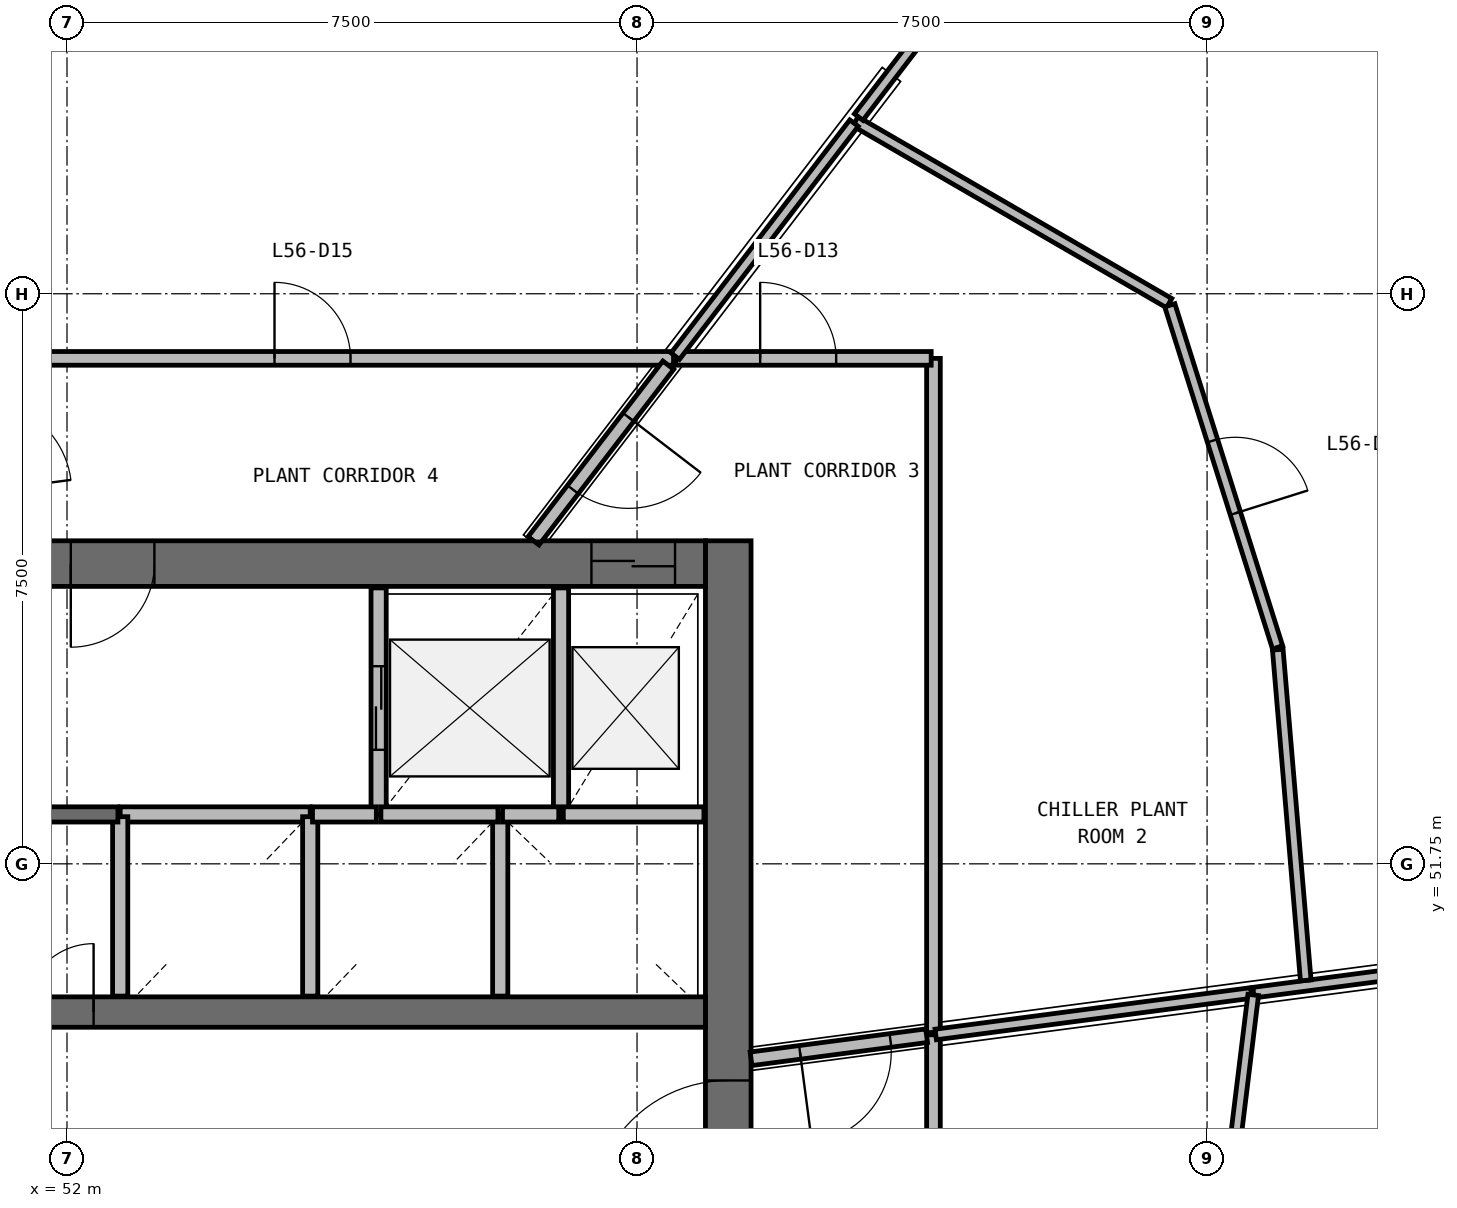
"""IFC4 building model, lengths in metres.
Left out: names, types, materials, properties, quantities, classifications, styles, units other than length and angle.
Written with IfcOpenShell. Run it as: python <this file> out.ifc"""

import sys

from ifc_helpers import new_model, si_unit, direction, frame, frame_2d, origin, place, context, subcontext, project, spatial, rectangle, extrude, source, transform, mapped, element, fill, save


model = new_model("IFC4")
c1 = context("Model", 3, precision=1e-05, world=origin(), true_north=direction((0.0, 1.0)))
c2 = subcontext(c1, "Body", "Model", "MODEL_VIEW")
j1 = project(units=[si_unit("LENGTHUNIT", "METRE"), si_unit("PLANEANGLEUNIT", "RADIAN")], contexts=[c1])
p1 = place(None, origin())
s1 = spatial("IfcSite", under=j1, at=p1, CompositionType="ELEMENT")
p2 = place(p1, origin())
s2 = spatial("IfcBuilding", under=s1, at=p2, CompositionType="ELEMENT")
p3 = place(p2, frame((0.0, 0.0, 230.6)))
s3 = spatial("IfcBuildingStorey", under=s2, at=p3, CompositionType="ELEMENT", Elevation=230.6)
p4 = place(p3, frame((60.7, 40.0, 0.0), z_axis=(0.0, 0.0, 1.0), x_axis=(0.0, 1.0, 0.0)))
e1 = element("IfcWall", 1, at=p4, inside=s3, PredefinedType="SHEAR", context=c2, shape_type="SweptSolid", body=[
    extrude(rectangle(XDim=16.0, YDim=0.6, at=frame_2d((8.0, 0.0))), origin(), (0.0, 0.0, 1.0), 3.9),
])
p5 = place(p4, frame((7.1, 0.0, 0.0)))
e2 = element("IfcOpeningElement", 2, at=p5, cuts=e1, PredefinedType="OPENING", context=c2, shape_type="SweptSolid", body=[
    extrude(rectangle(XDim=1.8, YDim=2.1, at=frame_2d((0.9, 1.05))), frame((0.0, 0.31, 0.0), z_axis=(0.0, -1.0, 0.0), x_axis=(1.0, 0.0, 0.0)), (0.0, 0.0, 1.0), 0.62),
])
p6 = place(p3, frame((60.4, 55.7, 0.0), z_axis=(0.0, 0.0, 1.0), x_axis=(-1.0, 0.0, 0.0)))
e3 = element("IfcWall", 3, at=p6, inside=s3, PredefinedType="SHEAR", context=c2, shape_type="SweptSolid", body=[
    extrude(rectangle(XDim=16.8, YDim=0.6, at=frame_2d((8.4, 0.0))), origin(), (0.0, 0.0, 1.0), 3.9),
])
p7 = place(p6, frame((0.4, 0.0, 0.0)))
e4 = element("IfcOpeningElement", 4, at=p7, cuts=e3, PredefinedType="OPENING", context=c2, shape_type="SweptSolid", body=[
    extrude(rectangle(XDim=1.1, YDim=2.1, at=frame_2d((0.55, 1.05))), frame((0.0, 0.31, 0.0), z_axis=(0.0, -1.0, 0.0), x_axis=(1.0, 0.0, 0.0)), (0.0, 0.0, 1.0), 0.62),
])
p8 = place(p6, frame((10.3, 0.0, 0.0)))
e5 = element("IfcOpeningElement", 5, at=p8, cuts=e3, PredefinedType="OPENING", context=c2, shape_type="SweptSolid", body=[
    extrude(rectangle(XDim=1.2, YDim=2.1, at=frame_2d((0.6, 1.05))), frame((0.0, 0.31, 0.0), z_axis=(0.0, -1.0, 0.0), x_axis=(1.0, 0.0, 0.0)), (0.0, 0.0, 1.0), 0.62),
])
p9 = place(p6, frame((7.25, 0.0, 0.0)))
e6 = element("IfcOpeningElement", 6, at=p9, cuts=e3, PredefinedType="OPENING", context=c2, shape_type="SweptSolid", body=[
    extrude(rectangle(XDim=1.1, YDim=2.1, at=frame_2d((0.55, 1.05))), frame((0.0, 0.31, 0.0), z_axis=(0.0, -1.0, 0.0), x_axis=(1.0, 0.0, 0.0)), (0.0, 0.0, 1.0), 0.62),
])
p10 = place(p3, frame((43.6, 49.8, 0.0), z_axis=(0.0, 0.0, 1.0), x_axis=(1.0, 0.0, 0.0)))
e7 = element("IfcWall", 7, at=p10, inside=s3, PredefinedType="SHEAR", context=c2, shape_type="SweptSolid", body=[
    extrude(rectangle(XDim=16.8, YDim=0.4, at=frame_2d((8.4, 0.0))), origin(), (0.0, 0.0, 1.0), 3.9),
])
p11 = place(p10, frame((4.45, 0.0, 0.0)))
e8 = element("IfcOpeningElement", 8, at=p11, cuts=e7, PredefinedType="OPENING", context=c2, shape_type="SweptSolid", body=[
    extrude(rectangle(XDim=0.9, YDim=2.1, at=frame_2d((0.45, 1.05))), frame((0.0, 0.21, 0.0), z_axis=(0.0, -1.0, 0.0), x_axis=(1.0, 0.0, 0.0)), (0.0, 0.0, 1.0), 0.42),
])
p12 = place(p10, frame((7.85, 0.0, 0.0)))
e9 = element("IfcOpeningElement", 9, at=p12, cuts=e7, PredefinedType="OPENING", context=c2, shape_type="SweptSolid", body=[
    extrude(rectangle(XDim=0.9, YDim=2.1, at=frame_2d((0.45, 1.05))), frame((0.0, 0.21, 0.0), z_axis=(0.0, -1.0, 0.0), x_axis=(1.0, 0.0, 0.0)), (0.0, 0.0, 1.0), 0.42),
])
p13 = place(p3, frame((56.1, 55.38, 0.0), z_axis=(0.0, 0.0, 1.0), x_axis=(0.0, -1.0, 0.0)))
e10 = element("IfcWall", 10, at=p13, inside=s3, PredefinedType="SOLIDWALL", context=c2, shape_type="SweptSolid", body=[
    extrude(rectangle(XDim=2.98, YDim=0.2, at=frame_2d((1.49, 0.0))), origin(), (0.0, 0.0, 1.0), 3.58),
])
p14 = place(p13, frame((1.03, 0.0, 0.0)))
e11 = element("IfcOpeningElement", 11, at=p14, cuts=e10, PredefinedType="OPENING", context=c2, shape_type="SweptSolid", body=[
    extrude(rectangle(XDim=1.1, YDim=2.1, at=frame_2d((0.55, 1.05))), frame((0.0, 0.11, 0.0), z_axis=(0.0, -1.0, 0.0), x_axis=(1.0, 0.0, 0.0)), (0.0, 0.0, 1.0), 0.22),
])
p15 = place(p3, frame((58.5, 52.4, 0.0), z_axis=(0.0, 0.0, 1.0), x_axis=(0.0, 1.0, 0.0)))
e12 = element("IfcWall", 12, at=p15, inside=s3, PredefinedType="SOLIDWALL", context=c2, shape_type="SweptSolid", body=[
    extrude(rectangle(XDim=2.98, YDim=0.2, at=frame_2d((1.49, 0.0))), origin(), (0.0, 0.0, 1.0), 3.58),
])
p16 = place(p3, frame((55.2, 52.4, 0.0), z_axis=(0.0, 0.0, 1.0), x_axis=(-1.0, 0.0, 0.0)))
e13 = element("IfcWall", 13, at=p16, inside=s3, PredefinedType="SOLIDWALL", context=c2, shape_type="SweptSolid", body=[
    extrude(rectangle(XDim=2.5, YDim=0.2, at=frame_2d((1.25, 0.0))), origin(), (0.0, 0.0, 1.0), 3.58),
])
for number, where, z_axis, x_axis in (
    (14, (52.7, 52.37, 0.0), (0.0, 0.0, 1.0), (0.0, -1.0, 0.0)),
    (15, (55.2, 50.01, 0.0), (0.0, 0.0, 1.0), (0.0, 1.0, 0.0)),
):
    element("IfcWall", number, at=place(p3, frame(where, z_axis=z_axis, x_axis=x_axis)), inside=s3, PredefinedType="SOLIDWALL", context=c2, shape_type="SweptSolid", body=[
        extrude(rectangle(XDim=2.36, YDim=0.2, at=frame_2d((1.18, 0.0))), origin(), (0.0, 0.0, 1.0), 3.58),
    ])
p17 = place(p3, frame((57.7, 50.01, 0.0), z_axis=(0.0, 0.0, 1.0), x_axis=(0.0, 1.0, 0.0)))
e16 = element("IfcWall", 16, at=p17, inside=s3, PredefinedType="SOLIDWALL", context=c2, shape_type="SweptSolid", body=[
    extrude(rectangle(XDim=2.39, YDim=0.2, at=frame_2d((1.195, 0.0))), origin(), (0.0, 0.0, 1.0), 3.58),
])
p18 = place(p3, frame((50.43, 52.4, 0.0), z_axis=(0.0, 0.0, 1.0), x_axis=(1.0, 0.0, 0.0)))
e17 = element("IfcWall", 17, at=p18, inside=s3, PredefinedType="SOLIDWALL", context=c2, shape_type="SweptSolid", body=[
    extrude(rectangle(XDim=2.24, YDim=0.2, at=frame_2d((1.12, 0.0))), origin(), (0.0, 0.0, 1.0), 3.58),
])
p19 = place(p3, frame((60.38, 52.4, 0.0), z_axis=(0.0, 0.0, 1.0), x_axis=(-1.0, 0.0, 0.0)))
e18 = element("IfcWall", 18, at=p19, inside=s3, PredefinedType="SOLIDWALL", context=c2, shape_type="SweptSolid", body=[
    extrude(rectangle(XDim=1.85, YDim=0.2, at=frame_2d((0.925, 0.0))), origin(), (0.0, 0.0, 1.0), 3.58),
])
p20 = place(p3, frame((57.67, 52.4, 0.0), z_axis=(0.0, 0.0, 1.0), x_axis=(-1.0, 0.0, 0.0)))
e19 = element("IfcWall", 19, at=p20, inside=s3, PredefinedType="SOLIDWALL", context=c2, shape_type="SweptSolid", body=[
    extrude(rectangle(XDim=1.54, YDim=0.2, at=frame_2d((0.77, 0.0))), origin(), (0.0, 0.0, 1.0), 3.58),
])
p21 = place(p3, frame((56.07, 52.4, 0.0), z_axis=(0.0, 0.0, 1.0), x_axis=(-1.0, 0.0, 0.0)))
e20 = element("IfcWall", 20, at=p21, inside=s3, PredefinedType="SOLIDWALL", context=c2, shape_type="SweptSolid", body=[
    extrude(rectangle(XDim=0.84, YDim=0.2, at=frame_2d((0.42, 0.0))), origin(), (0.0, 0.0, 1.0), 3.58),
])
p22 = place(p3, frame((58.47, 52.4, 0.0), z_axis=(0.0, 0.0, 1.0), x_axis=(-1.0, 0.0, 0.0)))
e21 = element("IfcWall", 21, at=p22, inside=s3, PredefinedType="SOLIDWALL", context=c2, shape_type="SweptSolid", body=[
    extrude(rectangle(XDim=0.74, YDim=0.2, at=frame_2d((0.37, 0.0))), origin(), (0.0, 0.0, 1.0), 3.58),
])
p23 = place(p3, frame((63.4, 49.501, 0.0), z_axis=(0.0, 0.0, 1.0), x_axis=(0.0, -1.0, 0.0)))
e22 = element("IfcWall", 22, at=p23, inside=s3, PredefinedType="PARTITIONING", context=c2, shape_type="SweptSolid", body=[
    extrude(rectangle(XDim=10.248, YDim=0.18, at=frame_2d((5.124, 0.0))), origin(), (0.0, 0.0, 1.0), 2.38),
])
p24 = place(p23, frame((4.598, 0.0, 0.0)))
e23 = element("IfcOpeningElement", 23, at=p24, cuts=e22, PredefinedType="OPENING", context=c2, shape_type="SweptSolid", body=[
    extrude(rectangle(XDim=1.0, YDim=2.1, at=frame_2d((0.5, 1.05))), frame((0.0, 0.1, 0.0), z_axis=(0.0, -1.0, 0.0), x_axis=(1.0, 0.0, 0.0)), (0.0, 0.0, 1.0), 0.2),
])
p25 = place(p3, frame((50.661, 58.4, 0.0), z_axis=(0.0, 0.0, 1.0), x_axis=(1.0, 0.0, 0.0)))
e24 = element("IfcWall", 24, at=p25, inside=s3, PredefinedType="PARTITIONING", context=c2, shape_type="SweptSolid", body=[
    extrude(rectangle(XDim=9.319, YDim=0.18, at=frame_2d((4.66, 0.0))), origin(), (0.0, 0.0, 1.0), 2.38),
])
p26 = place(p25, frame((4.069, 0.0, 0.0)))
e25 = element("IfcOpeningElement", 25, at=p26, cuts=e24, PredefinedType="OPENING", context=c2, shape_type="SweptSolid", body=[
    extrude(rectangle(XDim=1.0, YDim=2.1, at=frame_2d((0.5, 1.05))), frame((0.0, 0.1, 0.0), z_axis=(0.0, -1.0, 0.0), x_axis=(1.0, 0.0, 0.0)), (0.0, 0.0, 1.0), 0.2),
])
p27 = place(p3, frame((63.4, 49.531, 0.0), z_axis=(0.0, 0.0, 1.0), x_axis=(0.0, 1.0, 0.0)))
e26 = element("IfcWall", 26, at=p27, inside=s3, PredefinedType="PARTITIONING", context=c2, shape_type="SweptSolid", body=[
    extrude(rectangle(XDim=8.869, YDim=0.18, at=frame_2d((4.435, 0.0))), origin(), (0.0, 0.0, 1.0), 2.38),
])
p28 = place(p3, frame((60.01, 58.4, 0.0), z_axis=(0.0, 0.0, 1.0), x_axis=(1.0, 0.0, 0.0)))
e27 = element("IfcWall", 27, at=p28, inside=s3, PredefinedType="PARTITIONING", context=c2, shape_type="SweptSolid", body=[
    extrude(rectangle(XDim=3.36, YDim=0.18, at=frame_2d((1.68, 0.0))), origin(), (0.0, 0.0, 1.0), 2.38),
])
p29 = place(p28, frame((1.11, 0.0, 0.0)))
e28 = element("IfcOpeningElement", 28, at=p29, cuts=e27, PredefinedType="OPENING", context=c2, shape_type="SweptSolid", body=[
    extrude(rectangle(XDim=1.0, YDim=2.1, at=frame_2d((0.5, 1.05))), frame((0.0, 0.1, 0.0), z_axis=(0.0, -1.0, 0.0), x_axis=(1.0, 0.0, 0.0)), (0.0, 0.0, 1.0), 0.2),
])
p30 = place(p3, frame((59.911, 58.31, 0.0), z_axis=(0.0, 0.0, 1.0), x_axis=(-0.608737787706, -0.793371480341, 0.0)))
e29 = element("IfcWall", 29, at=p30, inside=s3, PredefinedType="PARTITIONING", context=c2, shape_type="SweptSolid", body=[
    extrude(rectangle(XDim=2.912, YDim=0.18, at=frame_2d((1.456, 0.0))), origin(), (0.0, 0.0, 1.0), 2.38),
])
p31 = place(p30, frame((0.862, 0.0, 0.0)))
e30 = element("IfcOpeningElement", 30, at=p31, cuts=e29, PredefinedType="OPENING", context=c2, shape_type="SweptSolid", body=[
    extrude(rectangle(XDim=1.2, YDim=2.1, at=frame_2d((0.6, 1.05))), frame((0.0, 0.1, 0.0), z_axis=(0.0, -1.0, 0.0), x_axis=(1.0, 0.0, 0.0)), (0.0, 0.0, 1.0), 0.2),
])
p32 = place(p3, frame((63.31, 49.489, 0.0), z_axis=(0.0, 0.0, 1.0), x_axis=(-0.991440737811, -0.130557509967, 0.0)))
e31 = element("IfcWall", 31, at=p32, inside=s3, PredefinedType="PARTITIONING", context=c2, shape_type="SweptSolid", body=[
    extrude(rectangle(XDim=2.33, YDim=0.18, at=frame_2d((1.165, 0.0))), origin(), (0.0, 0.0, 1.0), 2.38),
])
p33 = place(p32, frame((0.48, 0.0, 0.0)))
e32 = element("IfcOpeningElement", 32, at=p33, cuts=e31, PredefinedType="OPENING", context=c2, shape_type="SweptSolid", body=[
    extrude(rectangle(XDim=1.2, YDim=2.1, at=frame_2d((0.6, 1.05))), frame((0.0, 0.1, 0.0), z_axis=(0.0, -1.0, 0.0), x_axis=(1.0, 0.0, 0.0)), (0.0, 0.0, 1.0), 0.2),
])
p34 = place(p3, frame((67.611, 50.055, 0.0), z_axis=(0.0, 0.0, 1.0), x_axis=(0.991443419201, 0.130537146143, 0.0)))
e33 = element("IfcWall", 33, at=p34, inside=s3, PredefinedType="PARTITIONING", context=c2, shape_type="SweptSolid", body=[
    extrude(rectangle(XDim=5.044, YDim=0.14, at=frame_2d((2.522, 0.0))), origin(), (0.0, 0.0, 1.0), 2.38),
])
p35 = place(p3, frame((63.43, 49.505, 0.0), z_axis=(0.0, 0.0, 1.0), x_axis=(0.991450524652, 0.130483168137, 0.0)))
e34 = element("IfcWall", 34, at=p35, inside=s3, PredefinedType="PARTITIONING", context=c2, shape_type="SweptSolid", body=[
    extrude(rectangle(XDim=4.188, YDim=0.14, at=frame_2d((2.094, 0.0))), origin(), (0.0, 0.0, 1.0), 2.38),
])
p36 = place(p3, frame((66.5, 59.127, 0.0), z_axis=(0.0, 0.0, 1.0), x_axis=(-0.865241683045, 0.501354993914, 0.0)))
e35 = element("IfcWall", 35, at=p36, inside=s3, PredefinedType="PARTITIONING", context=c2, shape_type="SweptSolid", body=[
    extrude(rectangle(XDim=4.77, YDim=0.14, at=frame_2d((2.385, 0.0))), origin(), (0.0, 0.0, 1.0), 2.38),
])
p37 = place(p3, frame((66.51, 59.098, 0.0), z_axis=(0.0, 0.0, 1.0), x_axis=(0.300539528674, -0.953769359806, 0.0)))
e36 = element("IfcWall", 36, at=p37, inside=s3, PredefinedType="PARTITIONING", context=c2, shape_type="SweptSolid", body=[
    extrude(rectangle(XDim=4.719, YDim=0.14, at=frame_2d((2.359, 0.0))), origin(), (0.0, 0.0, 1.0), 2.38),
])
p38 = place(p37, frame((1.869, 0.0, 0.0)))
e37 = element("IfcOpeningElement", 37, at=p38, cuts=e36, PredefinedType="OPENING", context=c2, shape_type="SweptSolid", body=[
    extrude(rectangle(XDim=1.0, YDim=2.1, at=frame_2d((0.5, 1.05))), frame((0.0, 0.08, 0.0), z_axis=(0.0, -1.0, 0.0), x_axis=(1.0, 0.0, 0.0)), (0.0, 0.0, 1.0), 0.16),
])
p39 = place(p3, frame((68.298, 50.216, 0.0), z_axis=(0.0, 0.0, 1.0), x_axis=(-0.084308537488, 0.996439697376, 0.0)))
e38 = element("IfcWall", 38, at=p39, inside=s3, PredefinedType="PARTITIONING", context=c2, shape_type="SweptSolid", body=[
    extrude(rectangle(XDim=4.367, YDim=0.14, at=frame_2d((2.184, 0.0))), origin(), (0.0, 0.0, 1.0), 2.38),
])
p40 = place(p3, frame((67.115, 46.01, 0.0), z_axis=(0.0, 0.0, 1.0), x_axis=(0.121724415308, 0.992563935834, 0.0)))
e39 = element("IfcWall", 39, at=p40, inside=s3, PredefinedType="PARTITIONING", context=c2, shape_type="SweptSolid", body=[
    extrude(rectangle(XDim=4.045, YDim=0.14, at=frame_2d((2.023, 0.0))), origin(), (0.0, 0.0, 1.0), 2.38),
])
p41 = place(p3, frame((60.002, 58.429, 0.0), z_axis=(0.0, 0.0, 1.0), x_axis=(0.608748505227, 0.79336325689, 0.0)))
e40 = element("IfcWall", 40, at=p41, inside=s3, PredefinedType="PARTITIONING", context=c2, shape_type="SweptSolid", body=[
    extrude(rectangle(XDim=3.864, YDim=0.14, at=frame_2d((1.932, 0.0))), origin(), (0.0, 0.0, 1.0), 2.38),
])
p42 = place(p3, frame((62.416, 61.574, 0.0), z_axis=(0.0, 0.0, 1.0), x_axis=(0.608773631009, 0.793343977218, 0.0)))
e41 = element("IfcWall", 41, at=p42, inside=s3, PredefinedType="PARTITIONING", context=c2, shape_type="SweptSolid", body=[
    extrude(rectangle(XDim=3.64, YDim=0.14, at=frame_2d((1.82, 0.0))), origin(), (0.0, 0.0, 1.0), 2.38),
])
m1 = source(origin(), c2, "Body", "SweptSolid", [
    extrude(rectangle(XDim=1.8, YDim=2.1, at=frame_2d((0.9, 1.05))), frame((0.0, 0.025, 0.0), z_axis=(0.0, -1.0, 0.0), x_axis=(1.0, 0.0, 0.0)), (0.0, 0.0, 1.0), 0.05),
])
p43 = place(p5, origin())
e42 = element("IfcDoor", 42, at=p43, inside=s3, OperationType="SINGLE_SWING_LEFT", PredefinedType="DOOR", context=c2, shape_type="MappedRepresentation", body=[
    mapped(m1, transform((0.0, 0.0, 0.0), scale=1.0)),
])
fill(e2, e42)
m2 = source(origin(), c2, "Body", "SweptSolid", [
    extrude(rectangle(XDim=1.1, YDim=2.1, at=frame_2d((0.55, 1.05))), frame((0.0, 0.025, 0.0), z_axis=(0.0, -1.0, 0.0), x_axis=(1.0, 0.0, 0.0)), (0.0, 0.0, 1.0), 0.05),
])
p44 = place(p14, origin())
e43 = element("IfcDoor", 43, at=p44, inside=s3, OperationType="DOUBLE_DOOR_SLIDING", PredefinedType="USERDEFINED", context=c2, shape_type="MappedRepresentation", body=[
    mapped(m2, transform((0.0, 0.0, 0.0), scale=1.0)),
])
fill(e11, e43)
p45 = place(p7, origin())
e44 = element("IfcDoor", 44, at=p45, inside=s3, OperationType="DOUBLE_DOOR_SLIDING", PredefinedType="USERDEFINED", context=c2, shape_type="MappedRepresentation", body=[
    mapped(m2, transform((0.0, 0.0, 0.0), scale=1.0)),
])
fill(e4, e44)
m3 = source(origin(), c2, "Body", "SweptSolid", [
    extrude(rectangle(XDim=1.1, YDim=2.1, at=frame_2d((0.55, 1.05))), frame((0.0, 0.025, 0.0), z_axis=(0.0, -1.0, 0.0), x_axis=(1.0, 0.0, 0.0)), (0.0, 0.0, 1.0), 0.05),
])
p46 = place(p9, origin())
e45 = element("IfcDoor", 45, at=p46, inside=s3, OperationType="SINGLE_SWING_RIGHT", PredefinedType="DOOR", context=c2, shape_type="MappedRepresentation", body=[
    mapped(m3, transform((0.0, 0.0, 0.0), scale=1.0)),
])
fill(e6, e45)
m4 = source(origin(), c2, "Body", "SweptSolid", [
    extrude(rectangle(XDim=1.0, YDim=2.1, at=frame_2d((0.5, 1.05))), frame((0.0, 0.025, 0.0), z_axis=(0.0, -1.0, 0.0), x_axis=(1.0, 0.0, 0.0)), (0.0, 0.0, 1.0), 0.05),
])
p47 = place(p29, origin())
e46 = element("IfcDoor", 46, at=p47, inside=s3, OperationType="SINGLE_SWING_LEFT", PredefinedType="DOOR", context=c2, shape_type="MappedRepresentation", body=[
    mapped(m4, transform((0.0, 0.0, 0.0), scale=1.0)),
])
fill(e28, e46)
p48 = place(p38, origin())
e47 = element("IfcDoor", 47, at=p48, inside=s3, OperationType="SINGLE_SWING_RIGHT", PredefinedType="DOOR", context=c2, shape_type="MappedRepresentation", body=[
    mapped(m4, transform((0.0, 0.0, 0.0), scale=1.0)),
])
fill(e37, e47)
p49 = place(p26, origin())
e48 = element("IfcDoor", 48, at=p49, inside=s3, OperationType="SINGLE_SWING_LEFT", PredefinedType="DOOR", context=c2, shape_type="MappedRepresentation", body=[
    mapped(m4, transform((0.0, 0.0, 0.0), scale=1.0)),
])
fill(e25, e48)
m5 = source(origin(), c2, "Body", "SweptSolid", [
    extrude(rectangle(XDim=1.2, YDim=2.1, at=frame_2d((0.6, 1.05))), frame((0.0, 0.025, 0.0), z_axis=(0.0, -1.0, 0.0), x_axis=(1.0, 0.0, 0.0)), (0.0, 0.0, 1.0), 0.05),
])
p50 = place(p31, origin())
e49 = element("IfcDoor", 49, at=p50, inside=s3, OperationType="SINGLE_SWING_LEFT", PredefinedType="DOOR", context=c2, shape_type="MappedRepresentation", body=[
    mapped(m5, transform((0.0, 0.0, 0.0), scale=1.0)),
])
fill(e30, e49)
p51 = place(p33, origin())
e50 = element("IfcDoor", 50, at=p51, inside=s3, OperationType="SINGLE_SWING_RIGHT", PredefinedType="DOOR", context=c2, shape_type="MappedRepresentation", body=[
    mapped(m5, transform((0.0, 0.0, 0.0), scale=1.0)),
])
fill(e32, e50)
m6 = source(origin(), c2, "Body", "SweptSolid", [
    extrude(rectangle(XDim=0.9, YDim=2.1, at=frame_2d((0.45, 1.05))), frame((0.0, 0.025, 0.0), z_axis=(0.0, -1.0, 0.0), x_axis=(1.0, 0.0, 0.0)), (0.0, 0.0, 1.0), 0.05),
])
p52 = place(p12, origin())
e51 = element("IfcDoor", 51, at=p52, inside=s3, OperationType="SINGLE_SWING_RIGHT", PredefinedType="DOOR", context=c2, shape_type="MappedRepresentation", body=[
    mapped(m6, transform((0.0, 0.0, 0.0), scale=1.0)),
])
fill(e9, e51)
save(model, sys.argv[1])
